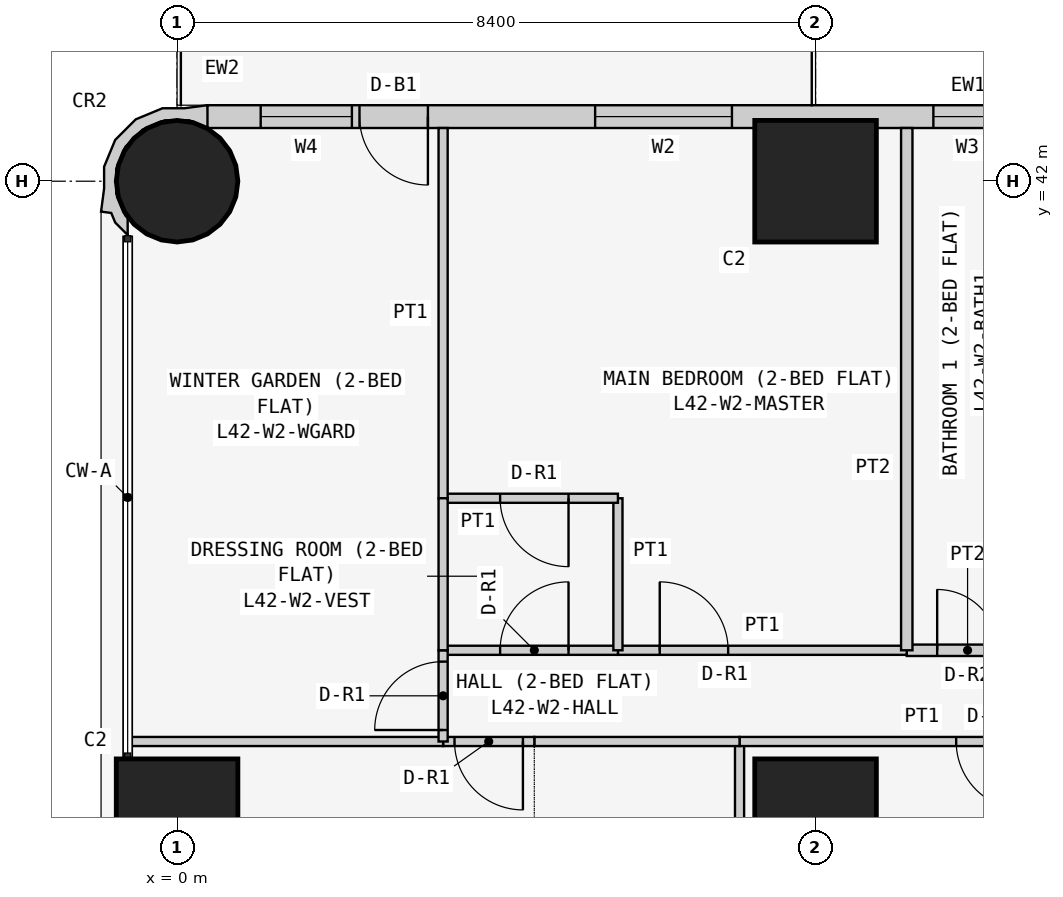
"""IFC4 building model, lengths in metres.
Left out: names, types, materials, properties, quantities, classifications, styles, units other than length and angle.
Written with IfcOpenShell. Run it as: python <this file> out.ifc"""

import sys

from ifc_helpers import new_model, si_unit, direction, frame, frame_2d, origin, origin_2d, place, context, subcontext, project, spatial, polyline, rectangle, circle, outline, extrude, element, fill, save


model = new_model("IFC4")
c1 = context("Model", 3, precision=1e-05, world=origin(), true_north=direction((0.0, 1.0)))
c2 = subcontext(c1, "Body", "Model", "MODEL_VIEW")
j1 = project(units=[si_unit("LENGTHUNIT", "METRE"), si_unit("PLANEANGLEUNIT", "RADIAN")], contexts=[c1])
p1 = place(None, origin())
s1 = spatial("IfcSite", under=j1, at=p1, CompositionType="ELEMENT")
p2 = place(p1, origin())
s2 = spatial("IfcBuilding", under=s1, at=p2, CompositionType="ELEMENT")
p3 = place(p2, frame((0.0, 0.0, 162.9)))
s3 = spatial("IfcBuildingStorey", under=s2, at=p3, CompositionType="ELEMENT", Elevation=162.9)
p4 = place(p3, frame((0.0, 33.6, 0.0), z_axis=(0.0, 0.0, 1.0), x_axis=(1.0, 0.0, 0.0)))
e1 = element("IfcColumn", 1, at=p4, inside=s3, PredefinedType="COLUMN", context=c2, shape_type="SweptSolid", body=[
    extrude(rectangle(XDim=1.6, YDim=1.6, at=origin_2d()), origin(), (0.0, 0.0, 1.0), 3.6),
])
p5 = place(p3, frame((0.0, 42.0, 0.0), z_axis=(0.0, 0.0, 1.0), x_axis=(1.0, 0.0, 0.0)))
e2 = element("IfcColumn", 2, at=p5, inside=s3, PredefinedType="COLUMN", context=c2, shape_type="SweptSolid", body=[
    extrude(circle(Radius=0.8, at=origin_2d()), origin(), (0.0, 0.0, 1.0), 3.6),
])
for number, where, z_axis, x_axis in (
    (3, (8.4, 33.6, 0.0), (0.0, 0.0, 1.0), (1.0, 0.0, 0.0)),
    (4, (8.4, 42.0, 0.0), (0.0, 0.0, 1.0), (1.0, 0.0, 0.0)),
):
    element("IfcColumn", number, at=place(p3, frame(where, z_axis=z_axis, x_axis=x_axis)), inside=s3, PredefinedType="COLUMN", context=c2, shape_type="SweptSolid", body=[
        extrude(rectangle(XDim=1.6, YDim=1.6, at=origin_2d()), origin(), (0.0, 0.0, 1.0), 3.6),
    ])
p6 = place(p3, frame((15.8, 42.85, 0.0), z_axis=(0.0, 0.0, 1.0), x_axis=(-1.0, 0.0, 0.0)))
e5 = element("IfcWall", 5, at=p6, inside=s3, PredefinedType="SOLIDWALL", context=c2, shape_type="SweptSolid", body=[
    extrude(rectangle(XDim=15.4, YDim=0.3, at=frame_2d((7.7, 0.0))), origin(), (0.0, 0.0, 1.0), 3.45),
])
p7 = place(p6, frame((1.2, 0.0, 0.9)))
e6 = element("IfcOpeningElement", 6, at=p7, cuts=e5, PredefinedType="OPENING", context=c2, shape_type="SweptSolid", body=[
    extrude(rectangle(XDim=1.8, YDim=1.5, at=frame_2d((0.9, 0.75))), frame((0.0, 0.16, 0.0), z_axis=(0.0, -1.0, 0.0), x_axis=(1.0, 0.0, 0.0)), (0.0, 0.0, 1.0), 0.32),
])
p8 = place(p6, frame((4.95, 0.0, 1.5)))
e7 = element("IfcOpeningElement", 7, at=p8, cuts=e5, PredefinedType="OPENING", context=c2, shape_type="SweptSolid", body=[
    extrude(rectangle(XDim=0.9, YDim=0.7, at=frame_2d((0.45, 0.35))), frame((0.0, 0.16, 0.0), z_axis=(0.0, -1.0, 0.0), x_axis=(1.0, 0.0, 0.0)), (0.0, 0.0, 1.0), 0.32),
])
p9 = place(p6, frame((8.5, 0.0, 0.9)))
e8 = element("IfcOpeningElement", 8, at=p9, cuts=e5, PredefinedType="OPENING", context=c2, shape_type="SweptSolid", body=[
    extrude(rectangle(XDim=1.8, YDim=1.5, at=frame_2d((0.9, 0.75))), frame((0.0, 0.16, 0.0), z_axis=(0.0, -1.0, 0.0), x_axis=(1.0, 0.0, 0.0)), (0.0, 0.0, 1.0), 0.32),
])
p10 = place(p6, frame((12.5, 0.0, 0.0)))
e9 = element("IfcOpeningElement", 9, at=p10, cuts=e5, PredefinedType="OPENING", context=c2, shape_type="SweptSolid", body=[
    extrude(rectangle(XDim=0.9, YDim=2.4, at=frame_2d((0.45, 1.2))), frame((0.0, 0.16, 0.0), z_axis=(0.0, -1.0, 0.0), x_axis=(1.0, 0.0, 0.0)), (0.0, 0.0, 1.0), 0.32),
])
p11 = place(p6, frame((13.5, 0.0, 0.9)))
e10 = element("IfcOpeningElement", 10, at=p11, cuts=e5, PredefinedType="OPENING", context=c2, shape_type="SweptSolid", body=[
    extrude(rectangle(XDim=1.2, YDim=1.5, at=frame_2d((0.6, 0.75))), frame((0.0, 0.16, 0.0), z_axis=(0.0, -1.0, 0.0), x_axis=(1.0, 0.0, 0.0)), (0.0, 0.0, 1.0), 0.32),
])
p12 = place(p3, frame((0.327, 42.817, 0.0), z_axis=(0.0, 0.0, 1.0), x_axis=(-0.93923434088, 0.343276641956, 0.0)))
e11 = element("IfcWall", 11, at=p12, inside=s3, PredefinedType="SOLIDWALL", context=c2, shape_type="SweptSolid", body=[
    extrude(outline(polyline([(-0.006, -0.197), (0.266, -0.055), (0.535, 0.044), (0.816, 0.302), (0.977, 0.648), (0.994, 1.03), (0.895, 1.299), (0.828, 1.598), (0.697, 1.569), (0.604, 1.67), (0.394, 1.767), (0.471, 1.556), (0.509, 1.539), (0.724, 1.304), (0.833, 1.005), (0.82, 0.687), (0.686, 0.397), (0.451, 0.182), (0.152, 0.073), (-0.116, 0.084), (-0.127, 0.078), (-0.146, 0.071), (-0.006, -0.197)])), origin(), (0.0, 0.0, 1.0), 3.45),
])
p13 = place(p3, frame((7.4, 29.4, 0.0), z_axis=(0.0, 0.0, 1.0), x_axis=(0.0, 1.0, 0.0)))
e12 = element("IfcWall", 12, at=p13, inside=s3, PredefinedType="PARTITIONING", context=c2, shape_type="SweptSolid", body=[
    extrude(rectangle(XDim=5.229, YDim=0.12, at=frame_2d((2.615, 0.0))), origin(), (0.0, 0.0, 1.0), 3.45),
])
p14 = place(p3, frame((7.4, 34.629, 0.0), z_axis=(0.0, 0.0, 1.0), x_axis=(1.0, 0.0, 0.0)))
e13 = element("IfcWall", 13, at=p14, inside=s3, PredefinedType="PARTITIONING", context=c2, shape_type="SweptSolid", body=[
    extrude(rectangle(XDim=4.8, YDim=0.12, at=frame_2d((2.4, 0.0))), origin(), (0.0, 0.0, 1.0), 3.45),
])
p15 = place(p14, frame((2.85, 0.0, 0.0)))
e14 = element("IfcOpeningElement", 14, at=p15, cuts=e13, PredefinedType="OPENING", context=c2, shape_type="SweptSolid", body=[
    extrude(rectangle(XDim=0.9, YDim=2.1, at=frame_2d((0.45, 1.05))), frame((0.0, 0.07, 0.0), z_axis=(0.0, -1.0, 0.0), x_axis=(1.0, 0.0, 0.0)), (0.0, 0.0, 1.0), 0.14),
])
p16 = place(p3, frame((4.7, 34.629, 0.0), z_axis=(0.0, 0.0, 1.0), x_axis=(1.0, 0.0, 0.0)))
e15 = element("IfcWall", 15, at=p16, inside=s3, PredefinedType="PARTITIONING", context=c2, shape_type="SweptSolid", body=[
    extrude(rectangle(XDim=2.7, YDim=0.12, at=frame_2d((1.35, 0.0))), origin(), (0.0, 0.0, 1.0), 3.45),
])
p17 = place(p3, frame((3.5, 34.629, 0.0), z_axis=(0.0, 0.0, 1.0), x_axis=(1.0, 0.0, 0.0)))
e16 = element("IfcWall", 16, at=p17, inside=s3, PredefinedType="PARTITIONING", context=c2, shape_type="SweptSolid", body=[
    extrude(rectangle(XDim=1.2, YDim=0.12, at=frame_2d((0.6, 0.0))), origin(), (0.0, 0.0, 1.0), 3.45),
])
p18 = place(p17, frame((0.15, 0.0, 0.0)))
e17 = element("IfcOpeningElement", 17, at=p18, cuts=e16, PredefinedType="OPENING", context=c2, shape_type="SweptSolid", body=[
    extrude(rectangle(XDim=0.9, YDim=2.1, at=frame_2d((0.45, 1.05))), frame((0.0, 0.07, 0.0), z_axis=(0.0, -1.0, 0.0), x_axis=(1.0, 0.0, 0.0)), (0.0, 0.0, 1.0), 0.14),
])
p19 = place(p3, frame((-0.65, 34.629, 0.0), z_axis=(0.0, 0.0, 1.0), x_axis=(1.0, 0.0, 0.0)))
e18 = element("IfcWall", 18, at=p19, inside=s3, PredefinedType="PARTITIONING", context=c2, shape_type="SweptSolid", body=[
    extrude(rectangle(XDim=4.15, YDim=0.12, at=frame_2d((2.075, 0.0))), origin(), (0.0, 0.0, 1.0), 3.45),
])
p20 = place(p3, frame((9.6, 35.829, 0.0), z_axis=(0.0, 0.0, 1.0), x_axis=(1.0, 0.0, 0.0)))
e19 = element("IfcWall", 19, at=p20, inside=s3, PredefinedType="PARTITIONING", context=c2, shape_type="SweptSolid", body=[
    extrude(rectangle(XDim=1.6, YDim=0.15, at=frame_2d((0.8, 0.0))), origin(), (0.0, 0.0, 1.0), 3.45),
])
p21 = place(p20, frame((0.4, 0.0, 0.0)))
e20 = element("IfcOpeningElement", 20, at=p21, cuts=e19, PredefinedType="OPENING", context=c2, shape_type="SweptSolid", body=[
    extrude(rectangle(XDim=0.8, YDim=2.1, at=frame_2d((0.4, 1.05))), frame((0.0, 0.085, 0.0), z_axis=(0.0, -1.0, 0.0), x_axis=(1.0, 0.0, 0.0)), (0.0, 0.0, 1.0), 0.17),
])
p22 = place(p3, frame((5.8, 35.829, 0.0), z_axis=(0.0, 0.0, 1.0), x_axis=(1.0, 0.0, 0.0)))
e21 = element("IfcWall", 21, at=p22, inside=s3, PredefinedType="PARTITIONING", context=c2, shape_type="SweptSolid", body=[
    extrude(rectangle(XDim=3.8, YDim=0.12, at=frame_2d((1.9, 0.0))), origin(), (0.0, 0.0, 1.0), 3.45),
])
p23 = place(p22, frame((0.55, 0.0, 0.0)))
e22 = element("IfcOpeningElement", 22, at=p23, cuts=e21, PredefinedType="OPENING", context=c2, shape_type="SweptSolid", body=[
    extrude(rectangle(XDim=0.9, YDim=2.1, at=frame_2d((0.45, 1.05))), frame((0.0, 0.07, 0.0), z_axis=(0.0, -1.0, 0.0), x_axis=(1.0, 0.0, 0.0)), (0.0, 0.0, 1.0), 0.14),
])
p24 = place(p3, frame((3.5, 35.829, 0.0), z_axis=(0.0, 0.0, 1.0), x_axis=(1.0, 0.0, 0.0)))
e23 = element("IfcWall", 23, at=p24, inside=s3, PredefinedType="PARTITIONING", context=c2, shape_type="SweptSolid", body=[
    extrude(rectangle(XDim=2.3, YDim=0.12, at=frame_2d((1.15, 0.0))), origin(), (0.0, 0.0, 1.0), 3.45),
])
p25 = place(p24, frame((0.75, 0.0, 0.0)))
e24 = element("IfcOpeningElement", 24, at=p25, cuts=e23, PredefinedType="OPENING", context=c2, shape_type="SweptSolid", body=[
    extrude(rectangle(XDim=0.9, YDim=2.1, at=frame_2d((0.45, 1.05))), frame((0.0, 0.07, 0.0), z_axis=(0.0, -1.0, 0.0), x_axis=(1.0, 0.0, 0.0)), (0.0, 0.0, 1.0), 0.14),
])
p26 = place(p3, frame((3.5, 34.629, 0.0), z_axis=(0.0, 0.0, 1.0), x_axis=(0.0, 1.0, 0.0)))
e25 = element("IfcWall", 25, at=p26, inside=s3, PredefinedType="PARTITIONING", context=c2, shape_type="SweptSolid", body=[
    extrude(rectangle(XDim=1.2, YDim=0.12, at=frame_2d((0.6, 0.0))), origin(), (0.0, 0.0, 1.0), 3.45),
])
p27 = place(p26, frame((0.151, 0.0, 0.0)))
e26 = element("IfcOpeningElement", 26, at=p27, cuts=e25, PredefinedType="OPENING", context=c2, shape_type="SweptSolid", body=[
    extrude(rectangle(XDim=0.9, YDim=2.1, at=frame_2d((0.45, 1.05))), frame((0.0, 0.07, 0.0), z_axis=(0.0, -1.0, 0.0), x_axis=(1.0, 0.0, 0.0)), (0.0, 0.0, 1.0), 0.14),
])
p28 = place(p3, frame((9.6, 35.829, 0.0), z_axis=(0.0, 0.0, 1.0), x_axis=(0.0, 1.0, 0.0)))
e27 = element("IfcWall", 27, at=p28, inside=s3, PredefinedType="PARTITIONING", context=c2, shape_type="SweptSolid", body=[
    extrude(rectangle(XDim=6.871, YDim=0.15, at=frame_2d((3.436, 0.0))), origin(), (0.0, 0.0, 1.0), 3.45),
])
p29 = place(p3, frame((5.8, 35.829, 0.0), z_axis=(0.0, 0.0, 1.0), x_axis=(0.0, 1.0, 0.0)))
e28 = element("IfcWall", 28, at=p29, inside=s3, PredefinedType="PARTITIONING", context=c2, shape_type="SweptSolid", body=[
    extrude(rectangle(XDim=2.0, YDim=0.12, at=frame_2d((1.0, 0.0))), origin(), (0.0, 0.0, 1.0), 3.45),
])
p30 = place(p3, frame((5.8, 37.829, 0.0), z_axis=(0.0, 0.0, 1.0), x_axis=(-1.0, 0.0, 0.0)))
e29 = element("IfcWall", 29, at=p30, inside=s3, PredefinedType="PARTITIONING", context=c2, shape_type="SweptSolid", body=[
    extrude(rectangle(XDim=2.3, YDim=0.12, at=frame_2d((1.15, 0.0))), origin(), (0.0, 0.0, 1.0), 3.45),
])
p31 = place(p30, frame((0.65, 0.0, 0.0)))
e30 = element("IfcOpeningElement", 30, at=p31, cuts=e29, PredefinedType="OPENING", context=c2, shape_type="SweptSolid", body=[
    extrude(rectangle(XDim=0.9, YDim=2.1, at=frame_2d((0.45, 1.05))), frame((0.0, 0.07, 0.0), z_axis=(0.0, -1.0, 0.0), x_axis=(1.0, 0.0, 0.0)), (0.0, 0.0, 1.0), 0.14),
])
p32 = place(p3, frame((3.5, 37.829, 0.0), z_axis=(0.0, 0.0, 1.0), x_axis=(0.0, 1.0, 0.0)))
e31 = element("IfcWall", 31, at=p32, inside=s3, PredefinedType="PARTITIONING", context=c2, shape_type="SweptSolid", body=[
    extrude(rectangle(XDim=4.871, YDim=0.12, at=frame_2d((2.436, 0.0))), origin(), (0.0, 0.0, 1.0), 3.45),
])
p33 = place(p3, frame((3.5, 35.829, 0.0), z_axis=(0.0, 0.0, 1.0), x_axis=(0.0, 1.0, 0.0)))
e32 = element("IfcWall", 32, at=p33, inside=s3, PredefinedType="PARTITIONING", context=c2, shape_type="SweptSolid", body=[
    extrude(rectangle(XDim=2.0, YDim=0.12, at=frame_2d((1.0, 0.0))), origin(), (0.0, 0.0, 1.0), 3.45),
])
p34 = place(p8, origin())
e33 = element("IfcWindow", 33, at=p34, inside=s3, PartitioningType="SINGLE_PANEL", PredefinedType="WINDOW", context=c2, shape_type="SweptSolid", body=[
    extrude(rectangle(XDim=0.9, YDim=0.7, at=frame_2d((0.45, 0.35))), frame((0.0, 0.03, 0.0), z_axis=(0.0, -1.0, 0.0), x_axis=(1.0, 0.0, 0.0)), (0.0, 0.0, 1.0), 0.06),
])
fill(e7, e33)
p35 = place(p9, origin())
e34 = element("IfcWindow", 34, at=p35, inside=s3, PartitioningType="SINGLE_PANEL", PredefinedType="WINDOW", context=c2, shape_type="SweptSolid", body=[
    extrude(rectangle(XDim=1.8, YDim=1.5, at=frame_2d((0.9, 0.75))), frame((0.0, 0.03, 0.0), z_axis=(0.0, -1.0, 0.0), x_axis=(1.0, 0.0, 0.0)), (0.0, 0.0, 1.0), 0.06),
])
fill(e8, e34)
p36 = place(p10, origin())
e35 = element("IfcDoor", 35, at=p36, inside=s3, OperationType="SINGLE_SWING_LEFT", PredefinedType="DOOR", context=c2, shape_type="SweptSolid", body=[
    extrude(rectangle(XDim=0.9, YDim=2.4, at=frame_2d((0.45, 1.2))), frame((0.0, 0.025, 0.0), z_axis=(0.0, -1.0, 0.0), x_axis=(1.0, 0.0, 0.0)), (0.0, 0.0, 1.0), 0.05),
])
fill(e9, e35)
p37 = place(p11, origin())
e36 = element("IfcWindow", 36, at=p37, inside=s3, PartitioningType="SINGLE_PANEL", PredefinedType="WINDOW", context=c2, shape_type="SweptSolid", body=[
    extrude(rectangle(XDim=1.2, YDim=1.5, at=frame_2d((0.6, 0.75))), frame((0.0, 0.03, 0.0), z_axis=(0.0, -1.0, 0.0), x_axis=(1.0, 0.0, 0.0)), (0.0, 0.0, 1.0), 0.06),
])
fill(e10, e36)
p38 = place(p15, frame((0.9, 0.0, 0.0), z_axis=(0.0, 0.0, 1.0), x_axis=(-1.0, 0.0, 0.0)))
e37 = element("IfcDoor", 37, at=p38, inside=s3, OperationType="SINGLE_SWING_LEFT", PredefinedType="DOOR", context=c2, shape_type="SweptSolid", body=[
    extrude(rectangle(XDim=0.9, YDim=2.1, at=frame_2d((0.45, 1.05))), frame((0.0, 0.025, 0.0), z_axis=(0.0, -1.0, 0.0), x_axis=(1.0, 0.0, 0.0)), (0.0, 0.0, 1.0), 0.05),
])
fill(e14, e37)
p39 = place(p18, frame((0.9, 0.0, 0.0), z_axis=(0.0, 0.0, 1.0), x_axis=(-1.0, 0.0, 0.0)))
e38 = element("IfcDoor", 38, at=p39, inside=s3, OperationType="SINGLE_SWING_LEFT", PredefinedType="DOOR", context=c2, shape_type="SweptSolid", body=[
    extrude(rectangle(XDim=0.9, YDim=2.1, at=frame_2d((0.45, 1.05))), frame((0.0, 0.025, 0.0), z_axis=(0.0, -1.0, 0.0), x_axis=(1.0, 0.0, 0.0)), (0.0, 0.0, 1.0), 0.05),
])
fill(e17, e38)
p40 = place(p21, origin())
e39 = element("IfcDoor", 39, at=p40, inside=s3, OperationType="SINGLE_SWING_LEFT", PredefinedType="DOOR", context=c2, shape_type="SweptSolid", body=[
    extrude(rectangle(XDim=0.8, YDim=2.1, at=frame_2d((0.4, 1.05))), frame((0.0, 0.025, 0.0), z_axis=(0.0, -1.0, 0.0), x_axis=(1.0, 0.0, 0.0)), (0.0, 0.0, 1.0), 0.05),
])
fill(e20, e39)
p41 = place(p23, origin())
e40 = element("IfcDoor", 40, at=p41, inside=s3, OperationType="SINGLE_SWING_LEFT", PredefinedType="DOOR", context=c2, shape_type="SweptSolid", body=[
    extrude(rectangle(XDim=0.9, YDim=2.1, at=frame_2d((0.45, 1.05))), frame((0.0, 0.025, 0.0), z_axis=(0.0, -1.0, 0.0), x_axis=(1.0, 0.0, 0.0)), (0.0, 0.0, 1.0), 0.05),
])
fill(e22, e40)
p42 = place(p25, origin())
e41 = element("IfcDoor", 41, at=p42, inside=s3, OperationType="SINGLE_SWING_RIGHT", PredefinedType="DOOR", context=c2, shape_type="SweptSolid", body=[
    extrude(rectangle(XDim=0.9, YDim=2.1, at=frame_2d((0.45, 1.05))), frame((0.0, 0.025, 0.0), z_axis=(0.0, -1.0, 0.0), x_axis=(1.0, 0.0, 0.0)), (0.0, 0.0, 1.0), 0.05),
])
fill(e24, e41)
p43 = place(p31, origin())
e42 = element("IfcDoor", 42, at=p43, inside=s3, OperationType="SINGLE_SWING_LEFT", PredefinedType="DOOR", context=c2, shape_type="SweptSolid", body=[
    extrude(rectangle(XDim=0.9, YDim=2.1, at=frame_2d((0.45, 1.05))), frame((0.0, 0.025, 0.0), z_axis=(0.0, -1.0, 0.0), x_axis=(1.0, 0.0, 0.0)), (0.0, 0.0, 1.0), 0.05),
])
fill(e30, e42)
p44 = place(p27, origin())
e43 = element("IfcDoor", 43, at=p44, inside=s3, OperationType="SINGLE_SWING_LEFT", PredefinedType="DOOR", context=c2, shape_type="SweptSolid", body=[
    extrude(rectangle(XDim=0.9, YDim=2.1, at=frame_2d((0.45, 1.05))), frame((0.0, 0.025, 0.0), z_axis=(0.0, -1.0, 0.0), x_axis=(1.0, 0.0, 0.0)), (0.0, 0.0, 1.0), 0.05),
])
fill(e26, e43)
save(model, sys.argv[1])
